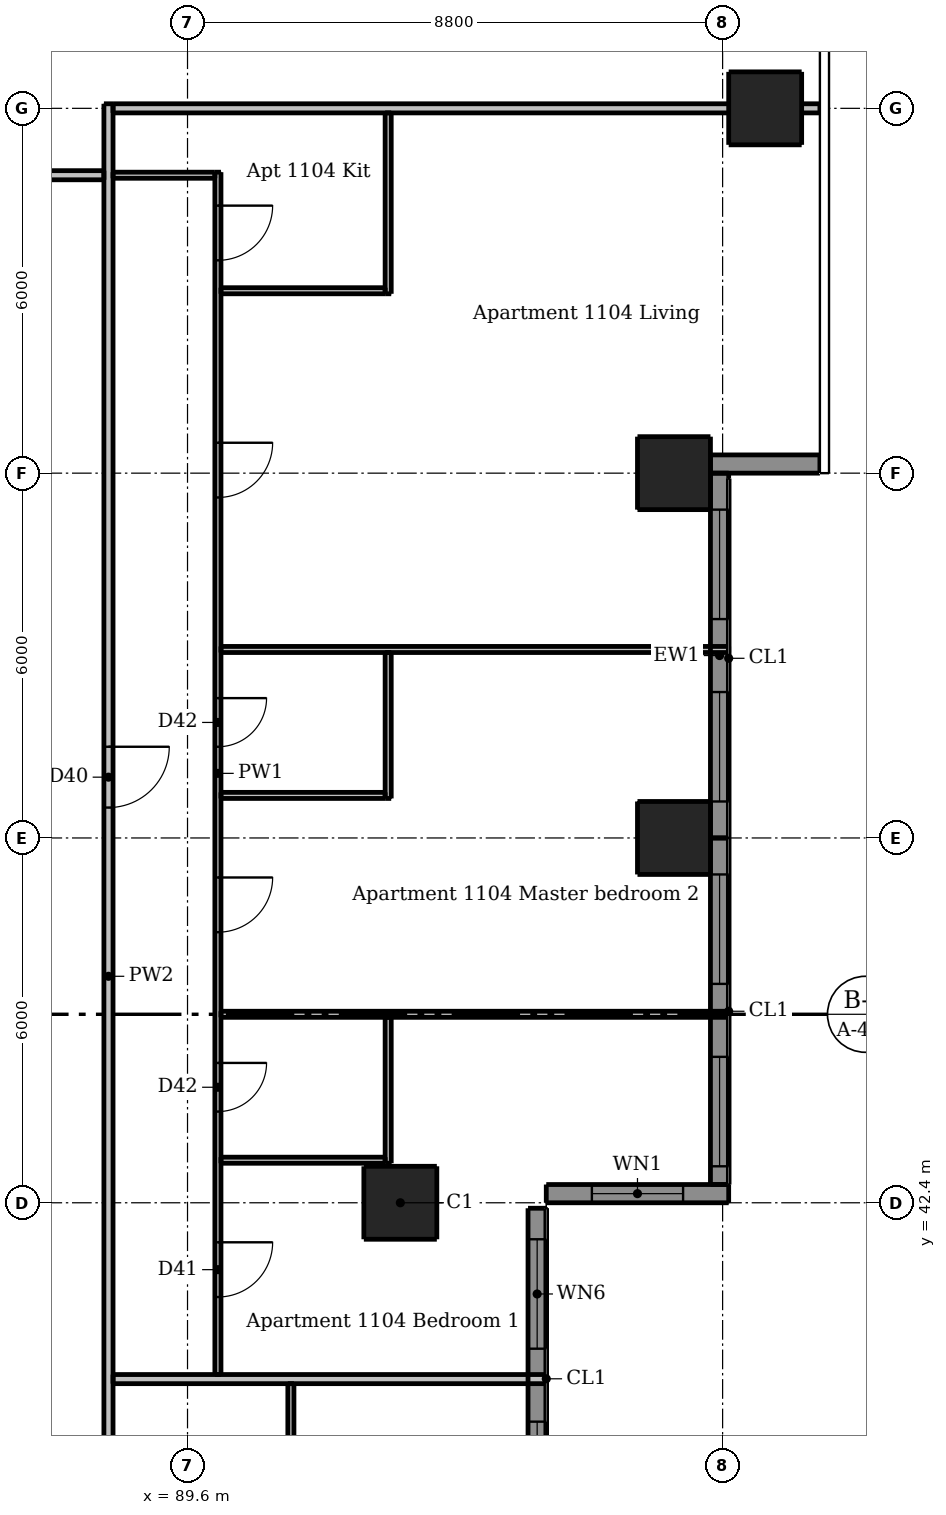
"""IFC4 building model, lengths in metres.
Left out: names, types, materials, properties, quantities, classifications, styles, units other than length and angle.
Written with IfcOpenShell. Run it as: python <this file> out.ifc"""

import sys

from ifc_helpers import new_model, si_unit, direction, frame, frame_2d, origin, origin_2d, place, context, subcontext, project, spatial, rectangle, extrude, element, fill, save


model = new_model("IFC4")
c1 = context("Model", 3, precision=1e-05, world=origin(), true_north=direction((0.0, 1.0)))
c2 = subcontext(c1, "Body", "Model", "MODEL_VIEW")
j1 = project(units=[si_unit("LENGTHUNIT", "METRE"), si_unit("PLANEANGLEUNIT", "RADIAN")], contexts=[c1])
p1 = place(None, origin())
s1 = spatial("IfcSite", under=j1, at=p1, CompositionType="ELEMENT")
p2 = place(p1, origin())
s2 = spatial("IfcBuilding", under=s1, at=p2, CompositionType="ELEMENT")
p3 = place(p2, frame((0.0, 0.0, 43.3)))
s3 = spatial("IfcBuildingStorey", under=s2, at=p3, CompositionType="ELEMENT", Elevation=43.3)
for number, where, z_axis, x_axis in (
    (1, (93.1, 42.4, 0.0), (0.0, 0.0, 1.0), (1.0, 0.0, 0.0)),
    (2, (97.6, 48.4, 0.0), (0.0, 0.0, 1.0), (1.0, 0.0, 0.0)),
    (3, (97.6, 54.4, 0.0), (0.0, 0.0, 1.0), (1.0, 0.0, 0.0)),
    (4, (99.1, 60.4, 0.0), (0.0, 0.0, 1.0), (1.0, 0.0, 0.0)),
):
    element("IfcColumn", number, at=place(p3, frame(where, z_axis=z_axis, x_axis=x_axis)), inside=s3, PredefinedType="COLUMN", context=c2, shape_type="SweptSolid", body=[
        extrude(rectangle(XDim=1.2, YDim=1.2, at=origin_2d()), origin(), (0.0, 0.0, 1.0), 3.05),
    ])
p4 = place(p3, frame((95.5, 42.55, 0.0), z_axis=(0.0, 0.0, 1.0), x_axis=(1.0, 0.0, 0.0)))
e5 = element("IfcWall", 5, at=p4, inside=s3, PredefinedType="SOLIDWALL", context=c2, shape_type="SweptSolid", body=[
    extrude(rectangle(XDim=3.0, YDim=0.3, at=frame_2d((1.5, 0.0))), origin(), (0.0, 0.0, 1.0), 3.05),
])
p5 = place(p4, frame((0.75, 0.0, 0.9)))
e6 = element("IfcOpeningElement", 6, at=p5, cuts=e5, PredefinedType="OPENING", context=c2, shape_type="SweptSolid", body=[
    extrude(rectangle(XDim=1.5, YDim=1.5, at=frame_2d((0.75, 0.75))), frame((0.0, 0.16, 0.0), z_axis=(0.0, -1.0, 0.0), x_axis=(1.0, 0.0, 0.0)), (0.0, 0.0, 1.0), 0.32),
])
p6 = place(p3, frame((98.2, 54.55, 0.0), z_axis=(0.0, 0.0, 1.0), x_axis=(1.0, 0.0, 0.0)))
e7 = element("IfcWall", 7, at=p6, inside=s3, PredefinedType="SOLIDWALL", context=c2, shape_type="SweptSolid", body=[
    extrude(rectangle(XDim=1.8, YDim=0.3, at=frame_2d((0.9, 0.0))), origin(), (0.0, 0.0, 1.0), 3.05),
])
p7 = place(p3, frame((95.35, 36.7, 0.0), z_axis=(0.0, 0.0, 1.0), x_axis=(0.0, 1.0, 0.0)))
e8 = element("IfcWall", 8, at=p7, inside=s3, PredefinedType="SOLIDWALL", context=c2, shape_type="SweptSolid", body=[
    extrude(rectangle(XDim=5.61, YDim=0.3, at=frame_2d((2.805, 0.0))), origin(), (0.0, 0.0, 1.0), 3.05),
])
p8 = place(p7, frame((0.3, 0.0, 0.15)))
e9 = element("IfcOpeningElement", 9, at=p8, cuts=e8, PredefinedType="OPENING", context=c2, shape_type="SweptSolid", body=[
    extrude(rectangle(XDim=1.8, YDim=2.1, at=frame_2d((0.9, 1.05))), frame((0.0, 0.16, 0.0), z_axis=(0.0, -1.0, 0.0), x_axis=(1.0, 0.0, 0.0)), (0.0, 0.0, 1.0), 0.32),
])
p9 = place(p7, frame((3.3, 0.0, 0.15)))
e10 = element("IfcOpeningElement", 10, at=p9, cuts=e8, PredefinedType="OPENING", context=c2, shape_type="SweptSolid", body=[
    extrude(rectangle(XDim=1.8, YDim=2.1, at=frame_2d((0.9, 1.05))), frame((0.0, 0.16, 0.0), z_axis=(0.0, -1.0, 0.0), x_axis=(1.0, 0.0, 0.0)), (0.0, 0.0, 1.0), 0.32),
])
p10 = place(p3, frame((98.35, 42.7, 0.0), z_axis=(0.0, 0.0, 1.0), x_axis=(0.0, 1.0, 0.0)))
e11 = element("IfcWall", 11, at=p10, inside=s3, PredefinedType="SOLIDWALL", context=c2, shape_type="SweptSolid", body=[
    extrude(rectangle(XDim=5.7, YDim=0.3, at=frame_2d((2.85, 0.0))), origin(), (0.0, 0.0, 1.0), 3.05),
])
p11 = place(p10, frame((0.3, 0.0, 0.15)))
e12 = element("IfcOpeningElement", 12, at=p11, cuts=e11, PredefinedType="OPENING", context=c2, shape_type="SweptSolid", body=[
    extrude(rectangle(XDim=1.8, YDim=2.1, at=frame_2d((0.9, 1.05))), frame((0.0, 0.16, 0.0), z_axis=(0.0, -1.0, 0.0), x_axis=(1.0, 0.0, 0.0)), (0.0, 0.0, 1.0), 0.32),
])
p12 = place(p10, frame((3.3, 0.0, 0.15)))
e13 = element("IfcOpeningElement", 13, at=p12, cuts=e11, PredefinedType="OPENING", context=c2, shape_type="SweptSolid", body=[
    extrude(rectangle(XDim=1.8, YDim=2.1, at=frame_2d((0.9, 1.05))), frame((0.0, 0.16, 0.0), z_axis=(0.0, -1.0, 0.0), x_axis=(1.0, 0.0, 0.0)), (0.0, 0.0, 1.0), 0.32),
])
p13 = place(p3, frame((98.35, 48.4, 0.0), z_axis=(0.0, 0.0, 1.0), x_axis=(0.0, 1.0, 0.0)))
e14 = element("IfcWall", 14, at=p13, inside=s3, PredefinedType="SOLIDWALL", context=c2, shape_type="SweptSolid", body=[
    extrude(rectangle(XDim=6.0, YDim=0.3, at=frame_2d((3.0, 0.0))), origin(), (0.0, 0.0, 1.0), 3.05),
])
p14 = place(p13, frame((0.6, 0.0, 0.15)))
e15 = element("IfcOpeningElement", 15, at=p14, cuts=e14, PredefinedType="OPENING", context=c2, shape_type="SweptSolid", body=[
    extrude(rectangle(XDim=1.8, YDim=2.1, at=frame_2d((0.9, 1.05))), frame((0.0, 0.16, 0.0), z_axis=(0.0, -1.0, 0.0), x_axis=(1.0, 0.0, 0.0)), (0.0, 0.0, 1.0), 0.32),
])
p15 = place(p13, frame((3.6, 0.0, 0.15)))
e16 = element("IfcOpeningElement", 16, at=p15, cuts=e14, PredefinedType="OPENING", context=c2, shape_type="SweptSolid", body=[
    extrude(rectangle(XDim=1.8, YDim=2.1, at=frame_2d((0.9, 1.05))), frame((0.0, 0.16, 0.0), z_axis=(0.0, -1.0, 0.0), x_axis=(1.0, 0.0, 0.0)), (0.0, 0.0, 1.0), 0.32),
])
p16 = place(p3, frame((90.1, 59.35, 0.0), z_axis=(0.0, 0.0, 1.0), x_axis=(0.0, -1.0, 0.0)))
e17 = element("IfcWall", 17, at=p16, inside=s3, PredefinedType="PARTITIONING", context=c2, shape_type="SweptSolid", body=[
    extrude(rectangle(XDim=19.775, YDim=0.1, at=frame_2d((9.888, 0.0))), origin(), (0.0, 0.0, 1.0), 3.05),
])
p17 = place(p16, frame((4.45, 0.0, 0.0)))
e18 = element("IfcOpeningElement", 18, at=p17, cuts=e17, PredefinedType="OPENING", context=c2, shape_type="SweptSolid", body=[
    extrude(rectangle(XDim=0.9, YDim=2.1, at=frame_2d((0.45, 1.05))), frame((0.0, 0.06, 0.0), z_axis=(0.0, -1.0, 0.0), x_axis=(1.0, 0.0, 0.0)), (0.0, 0.0, 1.0), 0.12),
])
p18 = place(p16, frame((0.55, 0.0, 0.0)))
e19 = element("IfcOpeningElement", 19, at=p18, cuts=e17, PredefinedType="OPENING", context=c2, shape_type="SweptSolid", body=[
    extrude(rectangle(XDim=0.9, YDim=2.1, at=frame_2d((0.45, 1.05))), frame((0.0, 0.06, 0.0), z_axis=(0.0, -1.0, 0.0), x_axis=(1.0, 0.0, 0.0)), (0.0, 0.0, 1.0), 0.12),
])
p19 = place(p16, frame((17.6, 0.0, 0.0)))
e20 = element("IfcOpeningElement", 20, at=p19, cuts=e17, PredefinedType="OPENING", context=c2, shape_type="SweptSolid", body=[
    extrude(rectangle(XDim=0.9, YDim=2.1, at=frame_2d((0.45, 1.05))), frame((0.0, 0.06, 0.0), z_axis=(0.0, -1.0, 0.0), x_axis=(1.0, 0.0, 0.0)), (0.0, 0.0, 1.0), 0.12),
])
p20 = place(p16, frame((11.6, 0.0, 0.0)))
e21 = element("IfcOpeningElement", 21, at=p20, cuts=e17, PredefinedType="OPENING", context=c2, shape_type="SweptSolid", body=[
    extrude(rectangle(XDim=0.9, YDim=2.1, at=frame_2d((0.45, 1.05))), frame((0.0, 0.06, 0.0), z_axis=(0.0, -1.0, 0.0), x_axis=(1.0, 0.0, 0.0)), (0.0, 0.0, 1.0), 0.12),
])
p21 = place(p16, frame((14.65, 0.0, 0.0)))
e22 = element("IfcOpeningElement", 22, at=p21, cuts=e17, PredefinedType="OPENING", context=c2, shape_type="SweptSolid", body=[
    extrude(rectangle(XDim=0.8, YDim=2.1, at=frame_2d((0.4, 1.05))), frame((0.0, 0.06, 0.0), z_axis=(0.0, -1.0, 0.0), x_axis=(1.0, 0.0, 0.0)), (0.0, 0.0, 1.0), 0.12),
])
p22 = place(p16, frame((8.65, 0.0, 0.0)))
e23 = element("IfcOpeningElement", 23, at=p22, cuts=e17, PredefinedType="OPENING", context=c2, shape_type="SweptSolid", body=[
    extrude(rectangle(XDim=0.8, YDim=2.1, at=frame_2d((0.4, 1.05))), frame((0.0, 0.06, 0.0), z_axis=(0.0, -1.0, 0.0), x_axis=(1.0, 0.0, 0.0)), (0.0, 0.0, 1.0), 0.12),
])
p23 = place(p3, frame((91.3, 33.45, 0.0), z_axis=(0.0, 0.0, 1.0), x_axis=(0.0, 1.0, 0.0)))
e24 = element("IfcWall", 24, at=p23, inside=s3, PredefinedType="PARTITIONING", context=c2, shape_type="SweptSolid", body=[
    extrude(rectangle(XDim=5.975, YDim=0.1, at=frame_2d((2.988, 0.0))), origin(), (0.0, 0.0, 1.0), 3.05),
])
p24 = place(p23, frame((3.8, 0.0, 0.0)))
e25 = element("IfcOpeningElement", 25, at=p24, cuts=e24, PredefinedType="OPENING", context=c2, shape_type="SweptSolid", body=[
    extrude(rectangle(XDim=0.8, YDim=2.1, at=frame_2d((0.4, 1.05))), frame((0.0, 0.06, 0.0), z_axis=(0.0, -1.0, 0.0), x_axis=(1.0, 0.0, 0.0)), (0.0, 0.0, 1.0), 0.12),
])
for number, where, z_axis, x_axis in (
    (26, (92.9, 43.05, 0.0), (0.0, 0.0, 1.0), (0.0, 1.0, 0.0)),
    (27, (92.9, 49.05, 0.0), (0.0, 0.0, 1.0), (0.0, 1.0, 0.0)),
):
    element("IfcWall", number, at=place(p3, frame(where, z_axis=z_axis, x_axis=x_axis)), inside=s3, PredefinedType="PARTITIONING", context=c2, shape_type="SweptSolid", body=[
        extrude(rectangle(XDim=2.4, YDim=0.1, at=frame_2d((1.2, 0.0))), origin(), (0.0, 0.0, 1.0), 3.05),
    ])
p25 = place(p3, frame((92.9, 57.35, 0.0), z_axis=(0.0, 0.0, 1.0), x_axis=(0.0, 1.0, 0.0)))
e28 = element("IfcWall", 28, at=p25, inside=s3, PredefinedType="PARTITIONING", context=c2, shape_type="SweptSolid", body=[
    extrude(rectangle(XDim=2.975, YDim=0.1, at=frame_2d((1.487, 0.0))), origin(), (0.0, 0.0, 1.0), 3.05),
])
p26 = place(p3, frame((88.375, 59.3, 0.0), z_axis=(0.0, 0.0, 1.0), x_axis=(1.0, 0.0, 0.0)))
e29 = element("IfcWall", 29, at=p26, inside=s3, PredefinedType="PARTITIONING", context=c2, shape_type="SweptSolid", body=[
    extrude(rectangle(XDim=1.675, YDim=0.1, at=frame_2d((0.837, 0.0))), origin(), (0.0, 0.0, 1.0), 3.05),
])
p27 = place(p3, frame((90.15, 57.4, 0.0), z_axis=(0.0, 0.0, 1.0), x_axis=(1.0, 0.0, 0.0)))
e30 = element("IfcWall", 30, at=p27, inside=s3, PredefinedType="PARTITIONING", context=c2, shape_type="SweptSolid", body=[
    extrude(rectangle(XDim=2.7, YDim=0.1, at=frame_2d((1.35, 0.0))), origin(), (0.0, 0.0, 1.0), 3.05),
])
p28 = place(p3, frame((90.15, 51.5, 0.0), z_axis=(0.0, 0.0, 1.0), x_axis=(1.0, 0.0, 0.0)))
e31 = element("IfcWall", 31, at=p28, inside=s3, PredefinedType="PARTITIONING", context=c2, shape_type="SweptSolid", body=[
    extrude(rectangle(XDim=8.35, YDim=0.1, at=frame_2d((4.175, 0.0))), origin(), (0.0, 0.0, 1.0), 3.05),
])
p29 = place(p3, frame((90.15, 49.1, 0.0), z_axis=(0.0, 0.0, 1.0), x_axis=(1.0, 0.0, 0.0)))
e32 = element("IfcWall", 32, at=p29, inside=s3, PredefinedType="PARTITIONING", context=c2, shape_type="SweptSolid", body=[
    extrude(rectangle(XDim=2.7, YDim=0.1, at=frame_2d((1.35, 0.0))), origin(), (0.0, 0.0, 1.0), 3.05),
])
p30 = place(p3, frame((90.15, 45.5, 0.0), z_axis=(0.0, 0.0, 1.0), x_axis=(1.0, 0.0, 0.0)))
e33 = element("IfcWall", 33, at=p30, inside=s3, PredefinedType="PARTITIONING", context=c2, shape_type="SweptSolid", body=[
    extrude(rectangle(XDim=8.35, YDim=0.1, at=frame_2d((4.175, 0.0))), origin(), (0.0, 0.0, 1.0), 3.05),
])
p31 = place(p3, frame((90.15, 43.1, 0.0), z_axis=(0.0, 0.0, 1.0), x_axis=(1.0, 0.0, 0.0)))
e34 = element("IfcWall", 34, at=p31, inside=s3, PredefinedType="PARTITIONING", context=c2, shape_type="SweptSolid", body=[
    extrude(rectangle(XDim=2.7, YDim=0.1, at=frame_2d((1.35, 0.0))), origin(), (0.0, 0.0, 1.0), 3.05),
])
p32 = place(p3, frame((88.3, 60.475, 0.0), z_axis=(0.0, 0.0, 1.0), x_axis=(0.0, -1.0, 0.0)))
e35 = element("IfcWall", 35, at=p32, inside=s3, PredefinedType="PARTITIONING", context=c2, shape_type="SweptSolid", body=[
    extrude(rectangle(XDim=28.7, YDim=0.15, at=frame_2d((14.35, 0.0))), origin(), (0.0, 0.0, 1.0), 3.05),
])
p33 = place(p32, frame((27.425, 0.0, 0.0)))
e36 = element("IfcOpeningElement", 36, at=p33, cuts=e35, PredefinedType="OPENING", context=c2, shape_type="SweptSolid", body=[
    extrude(rectangle(XDim=1.0, YDim=2.1, at=frame_2d((0.5, 1.05))), frame((0.0, 0.085, 0.0), z_axis=(0.0, -1.0, 0.0), x_axis=(1.0, 0.0, 0.0)), (0.0, 0.0, 1.0), 0.17),
])
p34 = place(p32, frame((10.575, 0.0, 0.0)))
e37 = element("IfcOpeningElement", 37, at=p34, cuts=e35, PredefinedType="OPENING", context=c2, shape_type="SweptSolid", body=[
    extrude(rectangle(XDim=1.0, YDim=2.1, at=frame_2d((0.5, 1.05))), frame((0.0, 0.085, 0.0), z_axis=(0.0, -1.0, 0.0), x_axis=(1.0, 0.0, 0.0)), (0.0, 0.0, 1.0), 0.17),
])
p35 = place(p3, frame((88.375, 60.4, 0.0), z_axis=(0.0, 0.0, 1.0), x_axis=(1.0, 0.0, 0.0)))
e38 = element("IfcWall", 38, at=p35, inside=s3, PredefinedType="PARTITIONING", context=c2, shape_type="SweptSolid", body=[
    extrude(rectangle(XDim=11.625, YDim=0.15, at=frame_2d((5.812, 0.0))), origin(), (0.0, 0.0, 1.0), 2.516),
])
p36 = place(p3, frame((59.675, 59.3, 0.0), z_axis=(0.0, 0.0, 1.0), x_axis=(1.0, 0.0, 0.0)))
e39 = element("IfcWall", 39, at=p36, inside=s3, PredefinedType="PARTITIONING", context=c2, shape_type="SweptSolid", body=[
    extrude(rectangle(XDim=28.55, YDim=0.15, at=frame_2d((14.275, 0.0))), origin(), (0.0, 0.0, 1.0), 3.05),
])
p37 = place(p36, frame((8.975, 0.0, 0.0)))
e40 = element("IfcOpeningElement", 40, at=p37, cuts=e39, PredefinedType="OPENING", context=c2, shape_type="SweptSolid", body=[
    extrude(rectangle(XDim=1.0, YDim=2.1, at=frame_2d((0.5, 1.05))), frame((0.0, 0.085, 0.0), z_axis=(0.0, -1.0, 0.0), x_axis=(1.0, 0.0, 0.0)), (0.0, 0.0, 1.0), 0.17),
])
p38 = place(p36, frame((25.775, 0.0, 0.0)))
e41 = element("IfcOpeningElement", 41, at=p38, cuts=e39, PredefinedType="OPENING", context=c2, shape_type="SweptSolid", body=[
    extrude(rectangle(XDim=1.0, YDim=2.1, at=frame_2d((0.5, 1.05))), frame((0.0, 0.085, 0.0), z_axis=(0.0, -1.0, 0.0), x_axis=(1.0, 0.0, 0.0)), (0.0, 0.0, 1.0), 0.17),
])
p39 = place(p3, frame((88.375, 39.5, 0.0), z_axis=(0.0, 0.0, 1.0), x_axis=(1.0, 0.0, 0.0)))
e42 = element("IfcWall", 42, at=p39, inside=s3, PredefinedType="PARTITIONING", context=c2, shape_type="SweptSolid", body=[
    extrude(rectangle(XDim=7.125, YDim=0.15, at=frame_2d((3.562, 0.0))), origin(), (0.0, 0.0, 1.0), 3.05),
])
p40 = place(p5, origin())
e43 = element("IfcWindow", 43, at=p40, inside=s3, PartitioningType="DOUBLE_PANEL_VERTICAL", PredefinedType="WINDOW", context=c2, shape_type="SweptSolid", body=[
    extrude(rectangle(XDim=1.5, YDim=1.5, at=frame_2d((0.75, 0.75))), frame((0.0, 0.03, 0.0), z_axis=(0.0, -1.0, 0.0), x_axis=(1.0, 0.0, 0.0)), (0.0, 0.0, 1.0), 0.06),
])
fill(e6, e43)
p41 = place(p8, origin())
e44 = element("IfcWindow", 44, at=p41, inside=s3, PartitioningType="DOUBLE_PANEL_VERTICAL", PredefinedType="WINDOW", context=c2, shape_type="SweptSolid", body=[
    extrude(rectangle(XDim=1.8, YDim=2.1, at=frame_2d((0.9, 1.05))), frame((0.0, 0.03, 0.0), z_axis=(0.0, -1.0, 0.0), x_axis=(1.0, 0.0, 0.0)), (0.0, 0.0, 1.0), 0.06),
])
fill(e9, e44)
p42 = place(p9, origin())
e45 = element("IfcWindow", 45, at=p42, inside=s3, PartitioningType="DOUBLE_PANEL_VERTICAL", PredefinedType="WINDOW", context=c2, shape_type="SweptSolid", body=[
    extrude(rectangle(XDim=1.8, YDim=2.1, at=frame_2d((0.9, 1.05))), frame((0.0, 0.03, 0.0), z_axis=(0.0, -1.0, 0.0), x_axis=(1.0, 0.0, 0.0)), (0.0, 0.0, 1.0), 0.06),
])
fill(e10, e45)
p43 = place(p11, origin())
e46 = element("IfcWindow", 46, at=p43, inside=s3, PartitioningType="DOUBLE_PANEL_VERTICAL", PredefinedType="WINDOW", context=c2, shape_type="SweptSolid", body=[
    extrude(rectangle(XDim=1.8, YDim=2.1, at=frame_2d((0.9, 1.05))), frame((0.0, 0.03, 0.0), z_axis=(0.0, -1.0, 0.0), x_axis=(1.0, 0.0, 0.0)), (0.0, 0.0, 1.0), 0.06),
])
fill(e12, e46)
p44 = place(p12, origin())
e47 = element("IfcWindow", 47, at=p44, inside=s3, PartitioningType="DOUBLE_PANEL_VERTICAL", PredefinedType="WINDOW", context=c2, shape_type="SweptSolid", body=[
    extrude(rectangle(XDim=1.8, YDim=2.1, at=frame_2d((0.9, 1.05))), frame((0.0, 0.03, 0.0), z_axis=(0.0, -1.0, 0.0), x_axis=(1.0, 0.0, 0.0)), (0.0, 0.0, 1.0), 0.06),
])
fill(e13, e47)
p45 = place(p14, origin())
e48 = element("IfcWindow", 48, at=p45, inside=s3, PartitioningType="DOUBLE_PANEL_VERTICAL", PredefinedType="WINDOW", context=c2, shape_type="SweptSolid", body=[
    extrude(rectangle(XDim=1.8, YDim=2.1, at=frame_2d((0.9, 1.05))), frame((0.0, 0.03, 0.0), z_axis=(0.0, -1.0, 0.0), x_axis=(1.0, 0.0, 0.0)), (0.0, 0.0, 1.0), 0.06),
])
fill(e15, e48)
p46 = place(p15, origin())
e49 = element("IfcWindow", 49, at=p46, inside=s3, PartitioningType="DOUBLE_PANEL_VERTICAL", PredefinedType="WINDOW", context=c2, shape_type="SweptSolid", body=[
    extrude(rectangle(XDim=1.8, YDim=2.1, at=frame_2d((0.9, 1.05))), frame((0.0, 0.03, 0.0), z_axis=(0.0, -1.0, 0.0), x_axis=(1.0, 0.0, 0.0)), (0.0, 0.0, 1.0), 0.06),
])
fill(e16, e49)
p47 = place(p34, origin())
e50 = element("IfcDoor", 50, at=p47, inside=s3, OperationType="SINGLE_SWING_LEFT", PredefinedType="DOOR", context=c2, shape_type="SweptSolid", body=[
    extrude(rectangle(XDim=1.0, YDim=2.1, at=frame_2d((0.5, 1.05))), frame((0.0, 0.025, 0.0), z_axis=(0.0, -1.0, 0.0), x_axis=(1.0, 0.0, 0.0)), (0.0, 0.0, 1.0), 0.05),
])
fill(e37, e50)
p48 = place(p17, origin())
e51 = element("IfcDoor", 51, at=p48, inside=s3, OperationType="SINGLE_SWING_LEFT", PredefinedType="DOOR", context=c2, shape_type="SweptSolid", body=[
    extrude(rectangle(XDim=0.9, YDim=2.1, at=frame_2d((0.45, 1.05))), frame((0.0, 0.025, 0.0), z_axis=(0.0, -1.0, 0.0), x_axis=(1.0, 0.0, 0.0)), (0.0, 0.0, 1.0), 0.05),
])
fill(e18, e51)
p49 = place(p18, origin())
e52 = element("IfcDoor", 52, at=p49, inside=s3, OperationType="SINGLE_SWING_LEFT", PredefinedType="DOOR", context=c2, shape_type="SweptSolid", body=[
    extrude(rectangle(XDim=0.9, YDim=2.1, at=frame_2d((0.45, 1.05))), frame((0.0, 0.025, 0.0), z_axis=(0.0, -1.0, 0.0), x_axis=(1.0, 0.0, 0.0)), (0.0, 0.0, 1.0), 0.05),
])
fill(e19, e52)
p50 = place(p19, origin())
e53 = element("IfcDoor", 53, at=p50, inside=s3, OperationType="SINGLE_SWING_LEFT", PredefinedType="DOOR", context=c2, shape_type="SweptSolid", body=[
    extrude(rectangle(XDim=0.9, YDim=2.1, at=frame_2d((0.45, 1.05))), frame((0.0, 0.025, 0.0), z_axis=(0.0, -1.0, 0.0), x_axis=(1.0, 0.0, 0.0)), (0.0, 0.0, 1.0), 0.05),
])
fill(e20, e53)
p51 = place(p20, origin())
e54 = element("IfcDoor", 54, at=p51, inside=s3, OperationType="SINGLE_SWING_LEFT", PredefinedType="DOOR", context=c2, shape_type="SweptSolid", body=[
    extrude(rectangle(XDim=0.9, YDim=2.1, at=frame_2d((0.45, 1.05))), frame((0.0, 0.025, 0.0), z_axis=(0.0, -1.0, 0.0), x_axis=(1.0, 0.0, 0.0)), (0.0, 0.0, 1.0), 0.05),
])
fill(e21, e54)
p52 = place(p21, origin())
e55 = element("IfcDoor", 55, at=p52, inside=s3, OperationType="SINGLE_SWING_LEFT", PredefinedType="DOOR", context=c2, shape_type="SweptSolid", body=[
    extrude(rectangle(XDim=0.8, YDim=2.1, at=frame_2d((0.4, 1.05))), frame((0.0, 0.025, 0.0), z_axis=(0.0, -1.0, 0.0), x_axis=(1.0, 0.0, 0.0)), (0.0, 0.0, 1.0), 0.05),
])
fill(e22, e55)
p53 = place(p22, origin())
e56 = element("IfcDoor", 56, at=p53, inside=s3, OperationType="SINGLE_SWING_LEFT", PredefinedType="DOOR", context=c2, shape_type="SweptSolid", body=[
    extrude(rectangle(XDim=0.8, YDim=2.1, at=frame_2d((0.4, 1.05))), frame((0.0, 0.025, 0.0), z_axis=(0.0, -1.0, 0.0), x_axis=(1.0, 0.0, 0.0)), (0.0, 0.0, 1.0), 0.05),
])
fill(e23, e56)
save(model, sys.argv[1])
